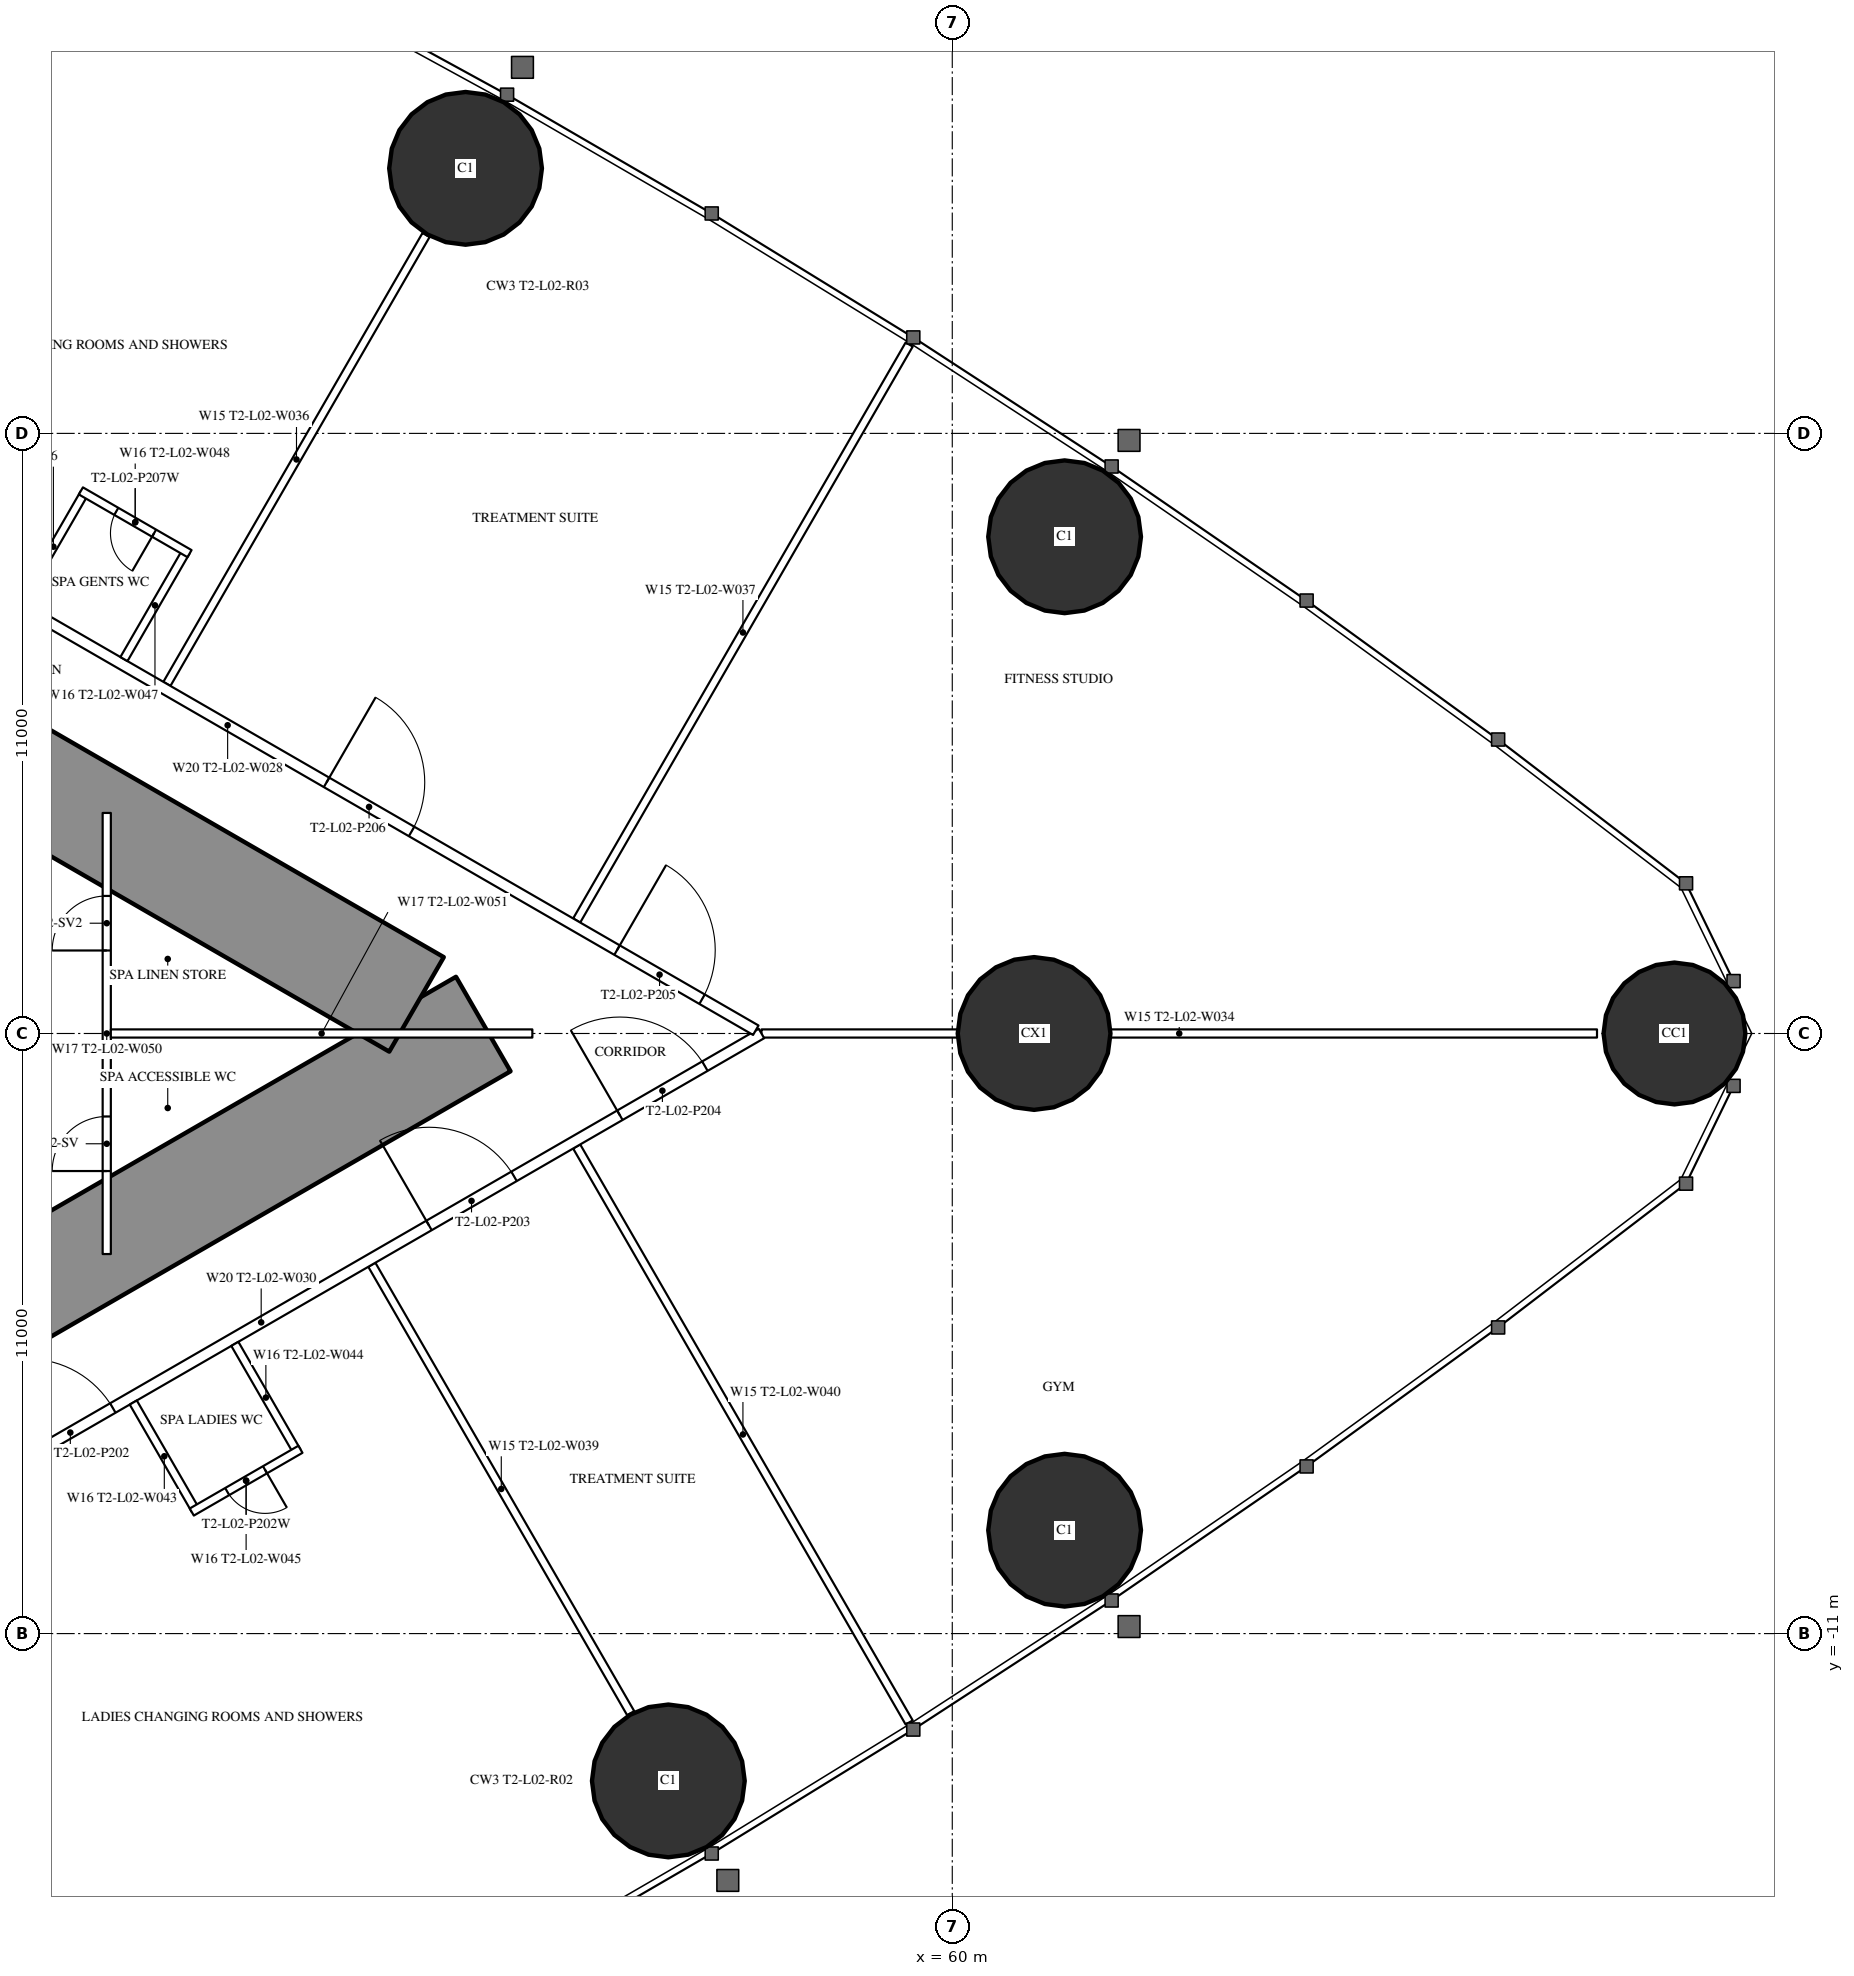
"""IFC4 building model, lengths in metres.
Left out: names, types, materials, properties, quantities, classifications, styles, units other than length and angle.
Written with IfcOpenShell. Run it as: python <this file> out.ifc"""

import sys

from ifc_helpers import new_model, si_unit, direction, frame, frame_2d, origin, origin_2d, place, context, subcontext, project, spatial, rectangle, hollow_circle, extrude, element, fill, save


model = new_model("IFC4")
c1 = context("Model", 3, precision=1e-05, world=origin(), true_north=direction((0.0, 1.0)))
c2 = subcontext(c1, "Body", "Model", "MODEL_VIEW")
j1 = project(units=[si_unit("LENGTHUNIT", "METRE"), si_unit("PLANEANGLEUNIT", "RADIAN")], contexts=[c1])
p1 = place(None, origin())
s1 = spatial("IfcSite", under=j1, at=p1, CompositionType="ELEMENT")
p2 = place(p1, origin())
s2 = spatial("IfcBuilding", under=s1, at=p2, CompositionType="ELEMENT")
p3 = place(p2, frame((0.0, 0.0, 12.6)))
s3 = spatial("IfcBuildingStorey", under=s2, at=p3, CompositionType="ELEMENT", Elevation=12.6)
p4 = place(p3, frame((73.239, 0.0, 0.0), z_axis=(0.0, 0.0, 1.0), x_axis=(1.0, 0.0, 0.0)))
e1 = element("IfcColumn", 1, at=p4, inside=s3, PredefinedType="COLUMN", context=c2, shape_type="SweptSolid", body=[
    extrude(hollow_circle(Radius=1.3, WallThickness=0.1, at=origin_2d()), origin(), (0.0, 0.0, 1.0), 5.4),
])
for number, where, z_axis, x_axis in (
    (2, (62.059, 9.105, 0.0), (0.0, 0.0, 1.0), (1.0, 0.0, 0.0)),
    (3, (51.078, 15.858, 0.0), (0.0, 0.0, 1.0), (1.0, 0.0, 0.0)),
    (4, (54.795, -13.701, 0.0), (0.0, 0.0, 1.0), (1.0, 0.0, 0.0)),
    (5, (62.059, -9.105, 0.0), (0.0, 0.0, 1.0), (1.0, 0.0, 0.0)),
):
    element("IfcColumn", number, at=place(p3, frame(where, z_axis=z_axis, x_axis=x_axis)), inside=s3, PredefinedType="COLUMN", context=c2, shape_type="SweptSolid", body=[
        extrude(hollow_circle(Radius=1.4, WallThickness=0.12, at=origin_2d()), origin(), (0.0, 0.0, 1.0), 5.4),
    ])
p5 = place(p3, frame((61.5, 0.0, 0.0), z_axis=(0.0, 0.0, 1.0), x_axis=(1.0, 0.0, 0.0)))
e6 = element("IfcColumn", 6, at=p5, inside=s3, PredefinedType="COLUMN", context=c2, shape_type="SweptSolid", body=[
    extrude(hollow_circle(Radius=1.4, WallThickness=0.1, at=origin_2d()), origin(), (0.0, 0.0, 1.0), 5.4),
])
p6 = place(p3, frame((27.2, -13.8, 0.0), z_axis=(0.0, 0.0, 1.0), x_axis=(0.866027159892, 0.499996958321, 0.0)))
e7 = element("IfcWall", 7, at=p6, inside=s3, PredefinedType="SHEAR", context=c2, shape_type="SweptSolid", body=[
    extrude(rectangle(XDim=27.947, YDim=2.0, at=frame_2d((13.973, 0.0))), origin(), (0.0, 0.0, 1.0), 5.4),
])
p7 = place(p6, frame((4.6, 0.0, 0.0)))
e8 = element("IfcOpeningElement", 8, at=p7, cuts=e7, PredefinedType="OPENING", context=c2, shape_type="SweptSolid", body=[
    extrude(rectangle(XDim=1.0, YDim=2.2, at=frame_2d((0.5, 1.1))), frame((0.0, 1.01, 0.0), z_axis=(0.0, -1.0, 0.0), x_axis=(1.0, 0.0, 0.0)), (0.0, 0.0, 1.0), 2.02),
])
p8 = place(p6, frame((13.395, 0.0, 0.0)))
e9 = element("IfcOpeningElement", 9, at=p8, cuts=e7, PredefinedType="OPENING", context=c2, shape_type="SweptSolid", body=[
    extrude(rectangle(XDim=1.8, YDim=2.2, at=frame_2d((0.9, 1.1))), frame((0.0, 1.01, 0.0), z_axis=(0.0, -1.0, 0.0), x_axis=(1.0, 0.0, 0.0)), (0.0, 0.0, 1.0), 2.02),
])
p9 = place(p3, frame((27.2, 13.8, 0.0), z_axis=(0.0, 0.0, 1.0), x_axis=(0.866024545924, -0.500001485854, 0.0)))
e10 = element("IfcWall", 10, at=p9, inside=s3, PredefinedType="SHEAR", context=c2, shape_type="SweptSolid", body=[
    extrude(rectangle(XDim=26.534, YDim=2.0, at=frame_2d((13.267, 0.0))), origin(), (0.0, 0.0, 1.0), 5.4),
])
p10 = place(p9, frame((4.6, 0.0, 0.0)))
e11 = element("IfcOpeningElement", 11, at=p10, cuts=e10, PredefinedType="OPENING", context=c2, shape_type="SweptSolid", body=[
    extrude(rectangle(XDim=1.0, YDim=2.2, at=frame_2d((0.5, 1.1))), frame((0.0, 1.01, 0.0), z_axis=(0.0, -1.0, 0.0), x_axis=(1.0, 0.0, 0.0)), (0.0, 0.0, 1.0), 2.02),
])
p11 = place(p9, frame((13.395, 0.0, 0.0)))
e12 = element("IfcOpeningElement", 12, at=p11, cuts=e10, PredefinedType="OPENING", context=c2, shape_type="SweptSolid", body=[
    extrude(rectangle(XDim=1.8, YDim=2.2, at=frame_2d((0.9, 1.1))), frame((0.0, 1.01, 0.0), z_axis=(0.0, -1.0, 0.0), x_axis=(1.0, 0.0, 0.0)), (0.0, 0.0, 1.0), 2.02),
])
p12 = place(p3, frame((49.36, -4.239, 0.0), z_axis=(0.0, 0.0, 1.0), x_axis=(0.499984446848, -0.866034383215, 0.0)))
e13 = element("IfcWall", 13, at=p12, inside=s3, PredefinedType="PARTITIONING", context=c2, shape_type="SweptSolid", body=[
    extrude(rectangle(XDim=9.491, YDim=0.15, at=frame_2d((4.746, 0.0))), origin(), (0.0, 0.0, 1.0), 4.15),
])
p13 = place(p3, frame((53.115, -2.071, 0.0), z_axis=(0.0, 0.0, 1.0), x_axis=(0.500000975677, -0.866024840476, 0.0)))
e14 = element("IfcWall", 14, at=p13, inside=s3, PredefinedType="PARTITIONING", context=c2, shape_type="SweptSolid", body=[
    extrude(rectangle(XDim=12.191, YDim=0.15, at=frame_2d((6.095, 0.0))), origin(), (0.0, 0.0, 1.0), 5.15),
])
p14 = place(p3, frame((45.603, 6.408, 0.0), z_axis=(0.0, 0.0, 1.0), x_axis=(0.499999740363, 0.866025553686, 0.0)))
e15 = element("IfcWall", 15, at=p14, inside=s3, PredefinedType="PARTITIONING", context=c2, shape_type="SweptSolid", body=[
    extrude(rectangle(XDim=9.501, YDim=0.15, at=frame_2d((4.751, 0.0))), origin(), (0.0, 0.0, 1.0), 4.15),
])
p15 = place(p3, frame((53.115, 2.071, 0.0), z_axis=(0.0, 0.0, 1.0), x_axis=(0.500000975677, 0.866024840476, 0.0)))
e16 = element("IfcWall", 16, at=p15, inside=s3, PredefinedType="PARTITIONING", context=c2, shape_type="SweptSolid", body=[
    extrude(rectangle(XDim=12.191, YDim=0.15, at=frame_2d((6.095, 0.0))), origin(), (0.0, 0.0, 1.0), 5.15),
])
p16 = place(p3, frame((56.502, 0.0, 0.0), z_axis=(0.0, 0.0, 1.0), x_axis=(1.0, 0.0, 0.0)))
e17 = element("IfcWall", 17, at=p16, inside=s3, PredefinedType="PARTITIONING", context=c2, shape_type="SweptSolid", body=[
    extrude(rectangle(XDim=15.317, YDim=0.15, at=frame_2d((7.658, 0.0))), origin(), (0.0, 0.0, 1.0), 4.15),
])
p17 = place(p3, frame((38.16, -10.59, 0.0), z_axis=(0.0, 0.0, 1.0), x_axis=(0.866027029586, 0.499997184019, 0.0)))
e18 = element("IfcWall", 18, at=p17, inside=s3, PredefinedType="PARTITIONING", context=c2, shape_type="SweptSolid", body=[
    extrude(rectangle(XDim=21.18, YDim=0.2, at=frame_2d((10.59, 0.0))), origin(), (0.0, 0.0, 1.0), 4.25),
])
p18 = place(p17, frame((14.142, 0.0, 0.0)))
e19 = element("IfcOpeningElement", 19, at=p18, cuts=e18, PredefinedType="OPENING", context=c2, shape_type="SweptSolid", body=[
    extrude(rectangle(XDim=1.8, YDim=2.2, at=frame_2d((0.9, 1.1))), frame((0.0, 0.11, 0.0), z_axis=(0.0, -1.0, 0.0), x_axis=(1.0, 0.0, 0.0)), (0.0, 0.0, 1.0), 0.22),
])
p19 = place(p17, frame((18.183, 0.0, 0.0)))
e20 = element("IfcOpeningElement", 20, at=p19, cuts=e18, PredefinedType="OPENING", context=c2, shape_type="SweptSolid", body=[
    extrude(rectangle(XDim=1.8, YDim=2.2, at=frame_2d((0.9, 1.1))), frame((0.0, 0.11, 0.0), z_axis=(0.0, -1.0, 0.0), x_axis=(1.0, 0.0, 0.0)), (0.0, 0.0, 1.0), 0.22),
])
p20 = place(p17, frame((5.65, 0.0, 0.0)))
e21 = element("IfcOpeningElement", 21, at=p20, cuts=e18, PredefinedType="OPENING", context=c2, shape_type="SweptSolid", body=[
    extrude(rectangle(XDim=1.8, YDim=2.2, at=frame_2d((0.9, 1.1))), frame((0.0, 0.11, 0.0), z_axis=(0.0, -1.0, 0.0), x_axis=(1.0, 0.0, 0.0)), (0.0, 0.0, 1.0), 0.22),
])
p21 = place(p3, frame((37.034, 11.24, 0.0), z_axis=(0.0, 0.0, 1.0), x_axis=(0.866025942536, -0.499999066854, 0.0)))
e22 = element("IfcWall", 22, at=p21, inside=s3, PredefinedType="PARTITIONING", context=c2, shape_type="SweptSolid", body=[
    extrude(rectangle(XDim=22.36, YDim=0.2, at=frame_2d((11.18, 0.0))), origin(), (0.0, 0.0, 1.0), 4.25),
])
p22 = place(p21, frame((19.423, 0.0, 0.0)))
e23 = element("IfcOpeningElement", 23, at=p22, cuts=e22, PredefinedType="OPENING", context=c2, shape_type="SweptSolid", body=[
    extrude(rectangle(XDim=1.8, YDim=2.2, at=frame_2d((0.9, 1.1))), frame((0.0, 0.11, 0.0), z_axis=(0.0, -1.0, 0.0), x_axis=(1.0, 0.0, 0.0)), (0.0, 0.0, 1.0), 0.22),
])
p23 = place(p21, frame((13.274, 0.0, 0.0)))
e24 = element("IfcOpeningElement", 24, at=p23, cuts=e22, PredefinedType="OPENING", context=c2, shape_type="SweptSolid", body=[
    extrude(rectangle(XDim=1.8, YDim=2.2, at=frame_2d((0.9, 1.1))), frame((0.0, 0.11, 0.0), z_axis=(0.0, -1.0, 0.0), x_axis=(1.0, 0.0, 0.0)), (0.0, 0.0, 1.0), 0.22),
])
p24 = place(p21, frame((4.602, 0.0, 0.0)))
e25 = element("IfcOpeningElement", 25, at=p24, cuts=e22, PredefinedType="OPENING", context=c2, shape_type="SweptSolid", body=[
    extrude(rectangle(XDim=1.8, YDim=2.2, at=frame_2d((0.9, 1.1))), frame((0.0, 0.11, 0.0), z_axis=(0.0, -1.0, 0.0), x_axis=(1.0, 0.0, 0.0)), (0.0, 0.0, 1.0), 0.22),
])
p25 = place(p3, frame((44.5, -4.043, 0.0), z_axis=(0.0, 0.0, 1.0), x_axis=(0.0, 1.0, 0.0)))
e26 = element("IfcWall", 26, at=p25, inside=s3, PredefinedType="PARTITIONING", context=c2, shape_type="SweptSolid", body=[
    extrude(rectangle(XDim=8.085, YDim=0.15, at=frame_2d((4.043, 0.0))), origin(), (0.0, 0.0, 1.0), 4.25),
])
p26 = place(p25, frame((1.521, 0.0, 0.0)))
e27 = element("IfcOpeningElement", 27, at=p26, cuts=e26, PredefinedType="OPENING", context=c2, shape_type="SweptSolid", body=[
    extrude(rectangle(XDim=1.0, YDim=2.2, at=frame_2d((0.5, 1.1))), frame((0.0, 0.085, 0.0), z_axis=(0.0, -1.0, 0.0), x_axis=(1.0, 0.0, 0.0)), (0.0, 0.0, 1.0), 0.17),
])
p27 = place(p25, frame((5.564, 0.0, 0.0)))
e28 = element("IfcOpeningElement", 28, at=p27, cuts=e26, PredefinedType="OPENING", context=c2, shape_type="SweptSolid", body=[
    extrude(rectangle(XDim=1.0, YDim=2.2, at=frame_2d((0.5, 1.1))), frame((0.0, 0.085, 0.0), z_axis=(0.0, -1.0, 0.0), x_axis=(1.0, 0.0, 0.0)), (0.0, 0.0, 1.0), 0.17),
])
p28 = place(p3, frame((44.575, 0.0, 0.0), z_axis=(0.0, 0.0, 1.0), x_axis=(1.0, 0.0, 0.0)))
e29 = element("IfcWall", 29, at=p28, inside=s3, PredefinedType="PARTITIONING", context=c2, shape_type="SweptSolid", body=[
    extrude(rectangle(XDim=7.727, YDim=0.15, at=frame_2d((3.864, 0.0))), origin(), (0.0, 0.0, 1.0), 4.15),
])
for number, where, z_axis, x_axis in (
    (30, (42.953, 7.938, 0.0), (0.0, 0.0, 1.0), (0.5, 0.866, 0.0)),
    (31, (44.815, 6.863, 0.0), (0.0, 0.0, 1.0), (0.5, 0.866, 0.0)),
):
    element("IfcWall", number, at=place(p3, frame(where, z_axis=z_axis, x_axis=x_axis)), inside=s3, PredefinedType="PARTITIONING", context=c2, shape_type="SweptSolid", body=[
        extrude(rectangle(XDim=2.275, YDim=0.15, at=frame_2d((1.137, 0.0))), origin(), (0.0, 0.0, 1.0), 5.15),
    ])
p29 = place(p3, frame((44.026, 9.946, 0.0), z_axis=(0.0, 0.0, 1.0), x_axis=(0.865980515519, -0.500077740698, 0.0)))
e32 = element("IfcWall", 32, at=p29, inside=s3, PredefinedType="PARTITIONING", context=c2, shape_type="SweptSolid", body=[
    extrude(rectangle(XDim=2.3, YDim=0.15, at=frame_2d((1.15, 0.0))), origin(), (0.0, 0.0, 1.0), 5.15),
])
p30 = place(p29, frame((0.75, 0.0, 0.0)))
e33 = element("IfcOpeningElement", 33, at=p30, cuts=e32, PredefinedType="OPENING", context=c2, shape_type="SweptSolid", body=[
    extrude(rectangle(XDim=0.8, YDim=2.2, at=frame_2d((0.4, 1.1))), frame((0.0, 0.085, 0.0), z_axis=(0.0, -1.0, 0.0), x_axis=(1.0, 0.0, 0.0)), (0.0, 0.0, 1.0), 0.17),
])
for number, where, z_axis, x_axis in (
    (34, (44.986, -6.764, 0.0), (0.0, 0.0, 1.0), (0.5, -0.866, 0.0)),
    (35, (46.848, -5.689, 0.0), (0.0, 0.0, 1.0), (0.5, -0.866, 0.0)),
):
    element("IfcWall", number, at=place(p3, frame(where, z_axis=z_axis, x_axis=x_axis)), inside=s3, PredefinedType="PARTITIONING", context=c2, shape_type="SweptSolid", body=[
        extrude(rectangle(XDim=2.275, YDim=0.15, at=frame_2d((1.137, 0.0))), origin(), (0.0, 0.0, 1.0), 5.15),
    ])
p31 = place(p3, frame((46.059, -8.772, 0.0), z_axis=(0.0, 0.0, 1.0), x_axis=(0.866007057882, 0.500031774688, 0.0)))
e36 = element("IfcWall", 36, at=p31, inside=s3, PredefinedType="PARTITIONING", context=c2, shape_type="SweptSolid", body=[
    extrude(rectangle(XDim=2.3, YDim=0.15, at=frame_2d((1.15, 0.0))), origin(), (0.0, 0.0, 1.0), 5.15),
])
p32 = place(p31, frame((0.75, 0.0, 0.0)))
e37 = element("IfcOpeningElement", 37, at=p32, cuts=e36, PredefinedType="OPENING", context=c2, shape_type="SweptSolid", body=[
    extrude(rectangle(XDim=0.8, YDim=2.2, at=frame_2d((0.4, 1.1))), frame((0.0, 0.085, 0.0), z_axis=(0.0, -1.0, 0.0), x_axis=(1.0, 0.0, 0.0)), (0.0, 0.0, 1.0), 0.17),
])
p33 = place(p18, origin())
e38 = element("IfcDoor", 38, at=p33, inside=s3, OperationType="DOUBLE_DOOR_SINGLE_SWING", PredefinedType="DOOR", context=c2, shape_type="SweptSolid", body=[
    extrude(rectangle(XDim=1.8, YDim=2.2, at=frame_2d((0.9, 1.1))), frame((0.0, 0.025, 0.0), z_axis=(0.0, -1.0, 0.0), x_axis=(1.0, 0.0, 0.0)), (0.0, 0.0, 1.0), 0.05),
])
fill(e19, e38)
p34 = place(p19, origin())
e39 = element("IfcDoor", 39, at=p34, inside=s3, OperationType="DOUBLE_DOOR_SINGLE_SWING", PredefinedType="DOOR", context=c2, shape_type="SweptSolid", body=[
    extrude(rectangle(XDim=1.8, YDim=2.2, at=frame_2d((0.9, 1.1))), frame((0.0, 0.025, 0.0), z_axis=(0.0, -1.0, 0.0), x_axis=(1.0, 0.0, 0.0)), (0.0, 0.0, 1.0), 0.05),
])
fill(e20, e39)
p35 = place(p22, origin())
e40 = element("IfcDoor", 40, at=p35, inside=s3, OperationType="DOUBLE_DOOR_SINGLE_SWING", PredefinedType="DOOR", context=c2, shape_type="SweptSolid", body=[
    extrude(rectangle(XDim=1.8, YDim=2.2, at=frame_2d((0.9, 1.1))), frame((0.0, 0.025, 0.0), z_axis=(0.0, -1.0, 0.0), x_axis=(1.0, 0.0, 0.0)), (0.0, 0.0, 1.0), 0.05),
])
fill(e23, e40)
p36 = place(p23, origin())
e41 = element("IfcDoor", 41, at=p36, inside=s3, OperationType="DOUBLE_DOOR_SINGLE_SWING", PredefinedType="DOOR", context=c2, shape_type="SweptSolid", body=[
    extrude(rectangle(XDim=1.8, YDim=2.2, at=frame_2d((0.9, 1.1))), frame((0.0, 0.025, 0.0), z_axis=(0.0, -1.0, 0.0), x_axis=(1.0, 0.0, 0.0)), (0.0, 0.0, 1.0), 0.05),
])
fill(e24, e41)
p37 = place(p20, origin())
e42 = element("IfcDoor", 42, at=p37, inside=s3, OperationType="DOUBLE_DOOR_SINGLE_SWING", PredefinedType="DOOR", context=c2, shape_type="SweptSolid", body=[
    extrude(rectangle(XDim=1.8, YDim=2.2, at=frame_2d((0.9, 1.1))), frame((0.0, 0.025, 0.0), z_axis=(0.0, -1.0, 0.0), x_axis=(1.0, 0.0, 0.0)), (0.0, 0.0, 1.0), 0.05),
])
fill(e21, e42)
p38 = place(p26, origin())
e43 = element("IfcDoor", 43, at=p38, inside=s3, OperationType="SINGLE_SWING_LEFT", PredefinedType="DOOR", context=c2, shape_type="SweptSolid", body=[
    extrude(rectangle(XDim=1.0, YDim=2.2, at=frame_2d((0.5, 1.1))), frame((0.0, 0.025, 0.0), z_axis=(0.0, -1.0, 0.0), x_axis=(1.0, 0.0, 0.0)), (0.0, 0.0, 1.0), 0.05),
])
fill(e27, e43)
p39 = place(p27, origin())
e44 = element("IfcDoor", 44, at=p39, inside=s3, OperationType="SINGLE_SWING_LEFT", PredefinedType="DOOR", context=c2, shape_type="SweptSolid", body=[
    extrude(rectangle(XDim=1.0, YDim=2.2, at=frame_2d((0.5, 1.1))), frame((0.0, 0.025, 0.0), z_axis=(0.0, -1.0, 0.0), x_axis=(1.0, 0.0, 0.0)), (0.0, 0.0, 1.0), 0.05),
])
fill(e28, e44)
p40 = place(p30, origin())
e45 = element("IfcDoor", 45, at=p40, inside=s3, OperationType="SINGLE_SWING_RIGHT", PredefinedType="DOOR", context=c2, shape_type="SweptSolid", body=[
    extrude(rectangle(XDim=0.8, YDim=2.2, at=frame_2d((0.4, 1.1))), frame((0.0, 0.025, 0.0), z_axis=(0.0, -1.0, 0.0), x_axis=(1.0, 0.0, 0.0)), (0.0, 0.0, 1.0), 0.05),
])
fill(e33, e45)
p41 = place(p32, origin())
e46 = element("IfcDoor", 46, at=p41, inside=s3, OperationType="SINGLE_SWING_RIGHT", PredefinedType="DOOR", context=c2, shape_type="SweptSolid", body=[
    extrude(rectangle(XDim=0.8, YDim=2.2, at=frame_2d((0.4, 1.1))), frame((0.0, 0.025, 0.0), z_axis=(0.0, -1.0, 0.0), x_axis=(1.0, 0.0, 0.0)), (0.0, 0.0, 1.0), 0.05),
])
fill(e37, e46)
save(model, sys.argv[1])
